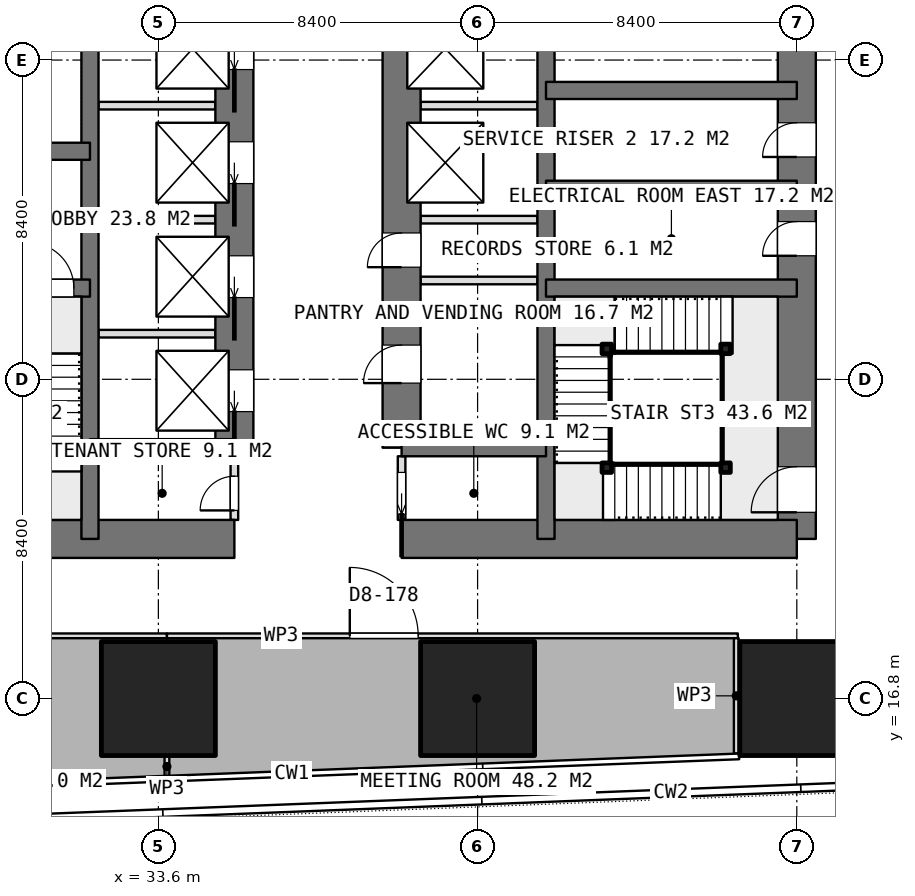
"""IFC4 building model, lengths in metres.
Left out: names, types, materials, properties, quantities, classifications, styles, units other than length and angle.
Written with IfcOpenShell. Run it as: python <this file> out.ifc"""

import sys

from ifc_helpers import new_model, si_unit, direction, frame, frame_2d, origin, origin_2d, place, context, subcontext, project, spatial, rectangle, extrude, element, fill, save


model = new_model("IFC4")
c1 = context("Model", 3, precision=1e-05, world=origin(), true_north=direction((0.0, 1.0)))
c2 = subcontext(c1, "Body", "Model", "MODEL_VIEW")
j1 = project(units=[si_unit("LENGTHUNIT", "METRE"), si_unit("PLANEANGLEUNIT", "RADIAN")], contexts=[c1])
p1 = place(None, origin())
s1 = spatial("IfcSite", under=j1, at=p1, CompositionType="ELEMENT")
p2 = place(p1, origin())
s2 = spatial("IfcBuilding", under=s1, at=p2, CompositionType="ELEMENT")
p3 = place(p2, frame((0.0, 0.0, 155.3)))
s3 = spatial("IfcBuildingStorey", under=s2, at=p3, CompositionType="ELEMENT", Elevation=155.3)
p4 = place(p3, frame((25.2, 21.0, 0.0), z_axis=(0.0, 0.0, 1.0), x_axis=(1.0, 0.0, 0.0)))
e1 = element("IfcWall", 1, at=p4, inside=s3, PredefinedType="SHEAR", context=c2, shape_type="SweptSolid", body=[
    extrude(rectangle(XDim=10.4, YDim=1.0, at=frame_2d((5.2, 0.0))), origin(), (0.0, 0.0, 1.0), 3.75),
])
p5 = place(p3, frame((40.0, 21.0, 0.0), z_axis=(0.0, 0.0, 1.0), x_axis=(1.0, 0.0, 0.0)))
e2 = element("IfcWall", 2, at=p5, inside=s3, PredefinedType="SHEAR", context=c2, shape_type="SweptSolid", body=[
    extrude(rectangle(XDim=10.4, YDim=1.0, at=frame_2d((5.2, 0.0))), origin(), (0.0, 0.0, 1.0), 3.75),
])
p6 = place(p3, frame((50.4, 21.0, 0.0), z_axis=(0.0, 0.0, 1.0), x_axis=(0.0, 1.0, 0.0)))
e3 = element("IfcWall", 3, at=p6, inside=s3, PredefinedType="SHEAR", context=c2, shape_type="SweptSolid", body=[
    extrude(rectangle(XDim=25.2, YDim=1.0, at=frame_2d((12.6, 0.0))), origin(), (0.0, 0.0, 1.0), 3.75),
])
p7 = place(p6, frame((16.2, 0.0, 0.0)))
e4 = element("IfcOpeningElement", 4, at=p7, cuts=e3, PredefinedType="OPENING", context=c2, shape_type="SweptSolid", body=[
    extrude(rectangle(XDim=1.2, YDim=2.1, at=frame_2d((0.6, 1.05))), frame((0.0, 0.51, 0.0), z_axis=(0.0, -1.0, 0.0), x_axis=(1.0, 0.0, 0.0)), (0.0, 0.0, 1.0), 1.02),
])
p8 = place(p6, frame((10.05, 0.0, 0.0)))
e5 = element("IfcOpeningElement", 5, at=p8, cuts=e3, PredefinedType="OPENING", context=c2, shape_type="SweptSolid", body=[
    extrude(rectangle(XDim=0.9, YDim=2.1, at=frame_2d((0.45, 1.05))), frame((0.0, 0.51, 0.0), z_axis=(0.0, -1.0, 0.0), x_axis=(1.0, 0.0, 0.0)), (0.0, 0.0, 1.0), 1.02),
])
p9 = place(p6, frame((7.45, 0.0, 0.0)))
e6 = element("IfcOpeningElement", 6, at=p9, cuts=e3, PredefinedType="OPENING", context=c2, shape_type="SweptSolid", body=[
    extrude(rectangle(XDim=0.9, YDim=2.1, at=frame_2d((0.45, 1.05))), frame((0.0, 0.51, 0.0), z_axis=(0.0, -1.0, 0.0), x_axis=(1.0, 0.0, 0.0)), (0.0, 0.0, 1.0), 1.02),
])
p10 = place(p6, frame((0.7, 0.0, 0.0)))
e7 = element("IfcOpeningElement", 7, at=p10, cuts=e3, PredefinedType="OPENING", context=c2, shape_type="SweptSolid", body=[
    extrude(rectangle(XDim=1.2, YDim=2.1, at=frame_2d((0.6, 1.05))), frame((0.0, 0.51, 0.0), z_axis=(0.0, -1.0, 0.0), x_axis=(1.0, 0.0, 0.0)), (0.0, 0.0, 1.0), 1.02),
])
for number, where, z_axis, x_axis in (
    (8, (31.8, 21.0, 0.0), (0.0, 0.0, 1.0), (0.0, 1.0, 0.0)),
    (9, (43.8, 21.0, 0.0), (0.0, 0.0, 1.0), (0.0, 1.0, 0.0)),
):
    element("IfcWall", number, at=place(p3, frame(where, z_axis=z_axis, x_axis=x_axis)), inside=s3, PredefinedType="SHEAR", context=c2, shape_type="SweptSolid", body=[
        extrude(rectangle(XDim=25.2, YDim=0.45, at=frame_2d((12.6, 0.0))), origin(), (0.0, 0.0, 1.0), 3.75),
    ])
p11 = place(p3, frame((35.6, 23.4, 0.0), z_axis=(0.0, 0.0, 1.0), x_axis=(0.0, 1.0, 0.0)))
e10 = element("IfcWall", 10, at=p11, inside=s3, PredefinedType="SHEAR", context=c2, shape_type="SweptSolid", body=[
    extrude(rectangle(XDim=18.0, YDim=1.0, at=frame_2d((9.0, 0.0))), origin(), (0.0, 0.0, 1.0), 3.75),
])
p12 = place(p11, frame((0.95, 0.0, 0.0)))
e11 = element("IfcOpeningElement", 11, at=p12, cuts=e10, PredefinedType="OPENING", context=c2, shape_type="SweptSolid", body=[
    extrude(rectangle(XDim=1.1, YDim=2.1, at=frame_2d((0.55, 1.05))), frame((0.0, 0.51, 0.0), z_axis=(0.0, -1.0, 0.0), x_axis=(1.0, 0.0, 0.0)), (0.0, 0.0, 1.0), 1.02),
])
p13 = place(p11, frame((3.95, 0.0, 0.0)))
e12 = element("IfcOpeningElement", 12, at=p13, cuts=e10, PredefinedType="OPENING", context=c2, shape_type="SweptSolid", body=[
    extrude(rectangle(XDim=1.1, YDim=2.1, at=frame_2d((0.55, 1.05))), frame((0.0, 0.51, 0.0), z_axis=(0.0, -1.0, 0.0), x_axis=(1.0, 0.0, 0.0)), (0.0, 0.0, 1.0), 1.02),
])
p14 = place(p11, frame((6.95, 0.0, 0.0)))
e13 = element("IfcOpeningElement", 13, at=p14, cuts=e10, PredefinedType="OPENING", context=c2, shape_type="SweptSolid", body=[
    extrude(rectangle(XDim=1.1, YDim=2.1, at=frame_2d((0.55, 1.05))), frame((0.0, 0.51, 0.0), z_axis=(0.0, -1.0, 0.0), x_axis=(1.0, 0.0, 0.0)), (0.0, 0.0, 1.0), 1.02),
])
p15 = place(p11, frame((9.95, 0.0, 0.0)))
e14 = element("IfcOpeningElement", 14, at=p15, cuts=e10, PredefinedType="OPENING", context=c2, shape_type="SweptSolid", body=[
    extrude(rectangle(XDim=1.1, YDim=2.1, at=frame_2d((0.55, 1.05))), frame((0.0, 0.51, 0.0), z_axis=(0.0, -1.0, 0.0), x_axis=(1.0, 0.0, 0.0)), (0.0, 0.0, 1.0), 1.02),
])
p16 = place(p11, frame((12.95, 0.0, 0.0)))
e15 = element("IfcOpeningElement", 15, at=p16, cuts=e10, PredefinedType="OPENING", context=c2, shape_type="SweptSolid", body=[
    extrude(rectangle(XDim=1.1, YDim=2.1, at=frame_2d((0.55, 1.05))), frame((0.0, 0.51, 0.0), z_axis=(0.0, -1.0, 0.0), x_axis=(1.0, 0.0, 0.0)), (0.0, 0.0, 1.0), 1.02),
])
p17 = place(p11, frame((15.95, 0.0, 0.0)))
e16 = element("IfcOpeningElement", 16, at=p17, cuts=e10, PredefinedType="OPENING", context=c2, shape_type="SweptSolid", body=[
    extrude(rectangle(XDim=1.1, YDim=2.1, at=frame_2d((0.55, 1.05))), frame((0.0, 0.51, 0.0), z_axis=(0.0, -1.0, 0.0), x_axis=(1.0, 0.0, 0.0)), (0.0, 0.0, 1.0), 1.02),
])
p18 = place(p3, frame((40.0, 23.4, 0.0), z_axis=(0.0, 0.0, 1.0), x_axis=(0.0, 1.0, 0.0)))
e17 = element("IfcWall", 17, at=p18, inside=s3, PredefinedType="SHEAR", context=c2, shape_type="SweptSolid", body=[
    extrude(rectangle(XDim=18.0, YDim=1.0, at=frame_2d((9.0, 0.0))), origin(), (0.0, 0.0, 1.0), 3.75),
])
p19 = place(p18, frame((1.7, 0.0, 0.0)))
e18 = element("IfcOpeningElement", 18, at=p19, cuts=e17, PredefinedType="OPENING", context=c2, shape_type="SweptSolid", body=[
    extrude(rectangle(XDim=1.0, YDim=2.1, at=frame_2d((0.5, 1.05))), frame((0.0, 0.51, 0.0), z_axis=(0.0, -1.0, 0.0), x_axis=(1.0, 0.0, 0.0)), (0.0, 0.0, 1.0), 1.02),
])
p20 = place(p18, frame((4.75, 0.0, 0.0)))
e19 = element("IfcOpeningElement", 19, at=p20, cuts=e17, PredefinedType="OPENING", context=c2, shape_type="SweptSolid", body=[
    extrude(rectangle(XDim=0.9, YDim=2.1, at=frame_2d((0.45, 1.05))), frame((0.0, 0.51, 0.0), z_axis=(0.0, -1.0, 0.0), x_axis=(1.0, 0.0, 0.0)), (0.0, 0.0, 1.0), 1.02),
])
for number, where, z_axis, x_axis in (
    (20, (31.8, 23.4, 0.0), (0.0, 0.0, 1.0), (1.0, 0.0, 0.0)),
    (21, (40.0, 23.4, 0.0), (0.0, 0.0, 1.0), (1.0, 0.0, 0.0)),
):
    element("IfcWall", number, at=place(p3, frame(where, z_axis=z_axis, x_axis=x_axis)), inside=s3, PredefinedType="SHEAR", context=c2, shape_type="SweptSolid", body=[
        extrude(rectangle(XDim=3.8, YDim=0.45, at=frame_2d((1.9, 0.0))), origin(), (0.0, 0.0, 1.0), 3.75),
    ])
p21 = place(p3, frame((25.2, 27.6, 0.0), z_axis=(0.0, 0.0, 1.0), x_axis=(1.0, 0.0, 0.0)))
e22 = element("IfcWall", 22, at=p21, inside=s3, PredefinedType="SHEAR", context=c2, shape_type="SweptSolid", body=[
    extrude(rectangle(XDim=6.6, YDim=0.45, at=frame_2d((3.3, 0.0))), origin(), (0.0, 0.0, 1.0), 3.75),
])
p22 = place(p21, frame((4.975, 0.0, 0.0)))
e23 = element("IfcOpeningElement", 23, at=p22, cuts=e22, PredefinedType="OPENING", context=c2, shape_type="SweptSolid", body=[
    extrude(rectangle(XDim=1.2, YDim=2.1, at=frame_2d((0.6, 1.05))), frame((0.0, 0.235, 0.0), z_axis=(0.0, -1.0, 0.0), x_axis=(1.0, 0.0, 0.0)), (0.0, 0.0, 1.0), 0.47),
])
p23 = place(p3, frame((25.2, 31.2, 0.0), z_axis=(0.0, 0.0, 1.0), x_axis=(1.0, 0.0, 0.0)))
e24 = element("IfcWall", 24, at=p23, inside=s3, PredefinedType="SHEAR", context=c2, shape_type="SweptSolid", body=[
    extrude(rectangle(XDim=6.6, YDim=0.45, at=frame_2d((3.3, 0.0))), origin(), (0.0, 0.0, 1.0), 3.75),
])
p24 = place(p23, frame((2.65, 0.0, 0.0)))
e25 = element("IfcOpeningElement", 25, at=p24, cuts=e24, PredefinedType="OPENING", context=c2, shape_type="SweptSolid", body=[
    extrude(rectangle(XDim=1.3, YDim=2.1, at=frame_2d((0.65, 1.05))), frame((0.0, 0.235, 0.0), z_axis=(0.0, -1.0, 0.0), x_axis=(1.0, 0.0, 0.0)), (0.0, 0.0, 1.0), 0.47),
])
for number, where, z_axis, x_axis in (
    (26, (43.8, 27.6, 0.0), (0.0, 0.0, 1.0), (1.0, 0.0, 0.0)),
    (27, (43.8, 30.2, 0.0), (0.0, 0.0, 1.0), (1.0, 0.0, 0.0)),
    (28, (43.8, 32.8, 0.0), (0.0, 0.0, 1.0), (1.0, 0.0, 0.0)),
):
    element("IfcWall", number, at=place(p3, frame(where, z_axis=z_axis, x_axis=x_axis)), inside=s3, PredefinedType="SHEAR", context=c2, shape_type="SweptSolid", body=[
        extrude(rectangle(XDim=6.6, YDim=0.45, at=frame_2d((3.3, 0.0))), origin(), (0.0, 0.0, 1.0), 3.75),
    ])
for number, where, z_axis, x_axis in (
    (29, (33.6, 16.8, 0.0), (0.0, 0.0, 1.0), (1.0, 0.0, 0.0)),
    (30, (42.0, 16.8, 0.0), (0.0, 0.0, 1.0), (1.0, 0.0, 0.0)),
    (31, (50.4, 16.8, 0.0), (0.0, 0.0, 1.0), (1.0, 0.0, 0.0)),
):
    element("IfcColumn", number, at=place(p3, frame(where, z_axis=z_axis, x_axis=x_axis)), inside=s3, PredefinedType="COLUMN", context=c2, shape_type="SweptSolid", body=[
        extrude(rectangle(XDim=3.0, YDim=3.0, at=origin_2d()), origin(), (0.0, 0.0, 1.0), 3.75),
    ])
for number, where, z_axis, x_axis in (
    (32, (32.025, 26.4, 0.0), (0.0, 0.0, 1.0), (1.0, 0.0, 0.0)),
    (33, (32.025, 29.4, 0.0), (0.0, 0.0, 1.0), (1.0, 0.0, 0.0)),
    (34, (32.025, 32.4, 0.0), (0.0, 0.0, 1.0), (1.0, 0.0, 0.0)),
):
    element("IfcWall", number, at=place(p3, frame(where, z_axis=z_axis, x_axis=x_axis)), inside=s3, PredefinedType="PARTITIONING", context=c2, shape_type="SweptSolid", body=[
        extrude(rectangle(XDim=3.075, YDim=0.2, at=frame_2d((1.538, 0.0))), origin(), (0.0, 0.0, 1.0), 3.5),
    ])
for number, where, z_axis, x_axis in (
    (35, (40.5, 29.4, 0.0), (0.0, 0.0, 1.0), (1.0, 0.0, 0.0)),
    (36, (40.5, 32.4, 0.0), (0.0, 0.0, 1.0), (1.0, 0.0, 0.0)),
):
    element("IfcWall", number, at=place(p3, frame(where, z_axis=z_axis, x_axis=x_axis)), inside=s3, PredefinedType="PARTITIONING", context=c2, shape_type="SweptSolid", body=[
        extrude(rectangle(XDim=3.075, YDim=0.2, at=frame_2d((1.538, 0.0))), origin(), (0.0, 0.0, 1.0), 3.5),
    ])
p25 = place(p3, frame((40.0, 21.5, 0.0), z_axis=(0.0, 0.0, 1.0), x_axis=(0.0, 1.0, 0.0)))
e37 = element("IfcWall", 37, at=p25, inside=s3, PredefinedType="PARTITIONING", context=c2, shape_type="SweptSolid", body=[
    extrude(rectangle(XDim=1.675, YDim=0.2, at=frame_2d((0.837, 0.0))), origin(), (0.0, 0.0, 1.0), 3.5),
])
p26 = place(p25, frame((0.15, 0.0, 0.0)))
e38 = element("IfcOpeningElement", 38, at=p26, cuts=e37, PredefinedType="OPENING", context=c2, shape_type="SweptSolid", body=[
    extrude(rectangle(XDim=1.1, YDim=2.1, at=frame_2d((0.55, 1.05))), frame((0.0, 0.11, 0.0), z_axis=(0.0, -1.0, 0.0), x_axis=(1.0, 0.0, 0.0)), (0.0, 0.0, 1.0), 0.22),
])
p27 = place(p3, frame((35.6, 21.5, 0.0), z_axis=(0.0, 0.0, 1.0), x_axis=(0.0, 1.0, 0.0)))
e39 = element("IfcWall", 39, at=p27, inside=s3, PredefinedType="PARTITIONING", context=c2, shape_type="SweptSolid", body=[
    extrude(rectangle(XDim=1.675, YDim=0.2, at=frame_2d((0.837, 0.0))), origin(), (0.0, 0.0, 1.0), 3.5),
])
p28 = place(p27, frame((0.25, 0.0, 0.0)))
e40 = element("IfcOpeningElement", 40, at=p28, cuts=e39, PredefinedType="OPENING", context=c2, shape_type="SweptSolid", body=[
    extrude(rectangle(XDim=0.9, YDim=2.1, at=frame_2d((0.45, 1.05))), frame((0.0, 0.11, 0.0), z_axis=(0.0, -1.0, 0.0), x_axis=(1.0, 0.0, 0.0)), (0.0, 0.0, 1.0), 0.22),
])
p29 = place(p3, frame((40.5, 27.8, 0.0), z_axis=(0.0, 0.0, 1.0), x_axis=(1.0, 0.0, 0.0)))
e41 = element("IfcWall", 41, at=p29, inside=s3, PredefinedType="PARTITIONING", context=c2, shape_type="SweptSolid", body=[
    extrude(rectangle(XDim=3.075, YDim=0.2, at=frame_2d((1.538, 0.0))), origin(), (0.0, 0.0, 1.0), 3.5),
])
p30 = place(p3, frame((25.38, 18.45, 0.0), z_axis=(0.0, 0.0, 1.0), x_axis=(1.0, 0.0, 0.0)))
e42 = element("IfcWall", 42, at=p30, inside=s3, PredefinedType="PARTITIONING", context=c2, shape_type="SweptSolid", body=[
    extrude(rectangle(XDim=8.445, YDim=0.125, at=frame_2d((4.223, 0.0))), origin(), (0.0, 0.0, 1.0), 3.5),
])
p31 = place(p30, frame((3.723, 0.0, 0.0)))
e43 = element("IfcOpeningElement", 43, at=p31, cuts=e42, PredefinedType="OPENING", context=c2, shape_type="SweptSolid", body=[
    extrude(rectangle(XDim=1.0, YDim=2.1, at=frame_2d((0.5, 1.05))), frame((0.0, 0.073, 0.0), z_axis=(0.0, -1.0, 0.0), x_axis=(1.0, 0.0, 0.0)), (0.0, 0.0, 1.0), 0.145),
])
p32 = place(p3, frame((33.825, 15.28, 0.0), z_axis=(0.0, 0.0, 1.0), x_axis=(0.0, -1.0, 0.0)))
e44 = element("IfcWall", 44, at=p32, inside=s3, PredefinedType="PARTITIONING", context=c2, shape_type="SweptSolid", body=[
    extrude(rectangle(XDim=0.538, YDim=0.125, at=frame_2d((0.269, 0.0))), origin(), (0.0, 0.0, 1.0), 3.5),
])
p33 = place(p3, frame((33.826, 18.45, 0.0), z_axis=(0.0, 0.0, 1.0), x_axis=(1.0, 0.0, 0.0)))
e45 = element("IfcWall", 45, at=p33, inside=s3, PredefinedType="PARTITIONING", context=c2, shape_type="SweptSolid", body=[
    extrude(rectangle(XDim=15.022, YDim=0.125, at=frame_2d((7.511, 0.0))), origin(), (0.0, 0.0, 1.0), 3.5),
])
p34 = place(p33, frame((4.811, 0.0, 0.0)))
e46 = element("IfcOpeningElement", 46, at=p34, cuts=e45, PredefinedType="OPENING", context=c2, shape_type="SweptSolid", body=[
    extrude(rectangle(XDim=1.8, YDim=2.1, at=frame_2d((0.9, 1.05))), frame((0.0, 0.073, 0.0), z_axis=(0.0, -1.0, 0.0), x_axis=(1.0, 0.0, 0.0)), (0.0, 0.0, 1.0), 0.145),
])
p35 = place(p3, frame((48.807, 18.387, 0.0), z_axis=(0.0, 0.0, 1.0), x_axis=(0.0, -1.0, 0.0)))
e47 = element("IfcWall", 47, at=p35, inside=s3, PredefinedType="PARTITIONING", context=c2, shape_type="SweptSolid", body=[
    extrude(rectangle(XDim=3.032, YDim=0.125, at=frame_2d((1.516, 0.0))), origin(), (0.0, 0.0, 1.0), 3.5),
])
for number, where, z_axis, x_axis in (
    (48, (48.525, 22.875, 0.0), (0.0, 0.0, 1.0), (1.0, 0.0, 0.0)),
    (49, (45.4, 22.875, 0.0), (0.0, 0.0, 1.0), (1.0, 0.0, 0.0)),
    (50, (45.4, 26.0, 0.0), (0.0, 0.0, 1.0), (1.0, 0.0, 0.0)),
    (51, (48.525, 26.0, 0.0), (0.0, 0.0, 1.0), (1.0, 0.0, 0.0)),
):
    element("IfcColumn", number, at=place(p3, frame(where, z_axis=z_axis, x_axis=x_axis)), inside=s3, PredefinedType="COLUMN", context=c2, shape_type="SweptSolid", body=[
        extrude(rectangle(XDim=0.25, YDim=0.25, at=origin_2d()), origin(), (0.0, 0.0, 1.0), 3.75),
    ])
p36 = place(p8, origin())
e52 = element("IfcDoor", 52, at=p36, inside=s3, OperationType="SINGLE_SWING_LEFT", PredefinedType="DOOR", context=c2, shape_type="SweptSolid", body=[
    extrude(rectangle(XDim=0.9, YDim=2.1, at=frame_2d((0.45, 1.05))), frame((0.0, 0.025, 0.0), z_axis=(0.0, -1.0, 0.0), x_axis=(1.0, 0.0, 0.0)), (0.0, 0.0, 1.0), 0.05),
])
fill(e5, e52)
p37 = place(p9, origin())
e53 = element("IfcDoor", 53, at=p37, inside=s3, OperationType="SINGLE_SWING_LEFT", PredefinedType="DOOR", context=c2, shape_type="SweptSolid", body=[
    extrude(rectangle(XDim=0.9, YDim=2.1, at=frame_2d((0.45, 1.05))), frame((0.0, 0.025, 0.0), z_axis=(0.0, -1.0, 0.0), x_axis=(1.0, 0.0, 0.0)), (0.0, 0.0, 1.0), 0.05),
])
fill(e6, e53)
p38 = place(p26, origin())
e54 = element("IfcDoor", 54, at=p38, inside=s3, OperationType="SLIDING_TO_LEFT", PredefinedType="DOOR", context=c2, shape_type="SweptSolid", body=[
    extrude(rectangle(XDim=1.1, YDim=2.1, at=frame_2d((0.55, 1.05))), frame((0.0, 0.025, 0.0), z_axis=(0.0, -1.0, 0.0), x_axis=(1.0, 0.0, 0.0)), (0.0, 0.0, 1.0), 0.05),
])
fill(e38, e54)
p39 = place(p28, origin())
e55 = element("IfcDoor", 55, at=p39, inside=s3, OperationType="SINGLE_SWING_LEFT", PredefinedType="DOOR", context=c2, shape_type="SweptSolid", body=[
    extrude(rectangle(XDim=0.9, YDim=2.1, at=frame_2d((0.45, 1.05))), frame((0.0, 0.025, 0.0), z_axis=(0.0, -1.0, 0.0), x_axis=(1.0, 0.0, 0.0)), (0.0, 0.0, 1.0), 0.05),
])
fill(e40, e55)
p40 = place(p19, origin())
e56 = element("IfcDoor", 56, at=p40, inside=s3, OperationType="SINGLE_SWING_LEFT", PredefinedType="DOOR", context=c2, shape_type="SweptSolid", body=[
    extrude(rectangle(XDim=1.0, YDim=2.1, at=frame_2d((0.5, 1.05))), frame((0.0, 0.025, 0.0), z_axis=(0.0, -1.0, 0.0), x_axis=(1.0, 0.0, 0.0)), (0.0, 0.0, 1.0), 0.05),
])
fill(e18, e56)
p41 = place(p20, origin())
e57 = element("IfcDoor", 57, at=p41, inside=s3, OperationType="SINGLE_SWING_LEFT", PredefinedType="DOOR", context=c2, shape_type="SweptSolid", body=[
    extrude(rectangle(XDim=0.9, YDim=2.1, at=frame_2d((0.45, 1.05))), frame((0.0, 0.025, 0.0), z_axis=(0.0, -1.0, 0.0), x_axis=(1.0, 0.0, 0.0)), (0.0, 0.0, 1.0), 0.05),
])
fill(e19, e57)
p42 = place(p12, origin())
e58 = element("IfcDoor", 58, at=p42, inside=s3, OperationType="SLIDING_TO_LEFT", PredefinedType="USERDEFINED", context=c2, shape_type="SweptSolid", body=[
    extrude(rectangle(XDim=1.1, YDim=2.1, at=frame_2d((0.55, 1.05))), frame((0.0, 0.025, 0.0), z_axis=(0.0, -1.0, 0.0), x_axis=(1.0, 0.0, 0.0)), (0.0, 0.0, 1.0), 0.05),
])
fill(e11, e58)
p43 = place(p13, origin())
e59 = element("IfcDoor", 59, at=p43, inside=s3, OperationType="SLIDING_TO_LEFT", PredefinedType="USERDEFINED", context=c2, shape_type="SweptSolid", body=[
    extrude(rectangle(XDim=1.1, YDim=2.1, at=frame_2d((0.55, 1.05))), frame((0.0, 0.025, 0.0), z_axis=(0.0, -1.0, 0.0), x_axis=(1.0, 0.0, 0.0)), (0.0, 0.0, 1.0), 0.05),
])
fill(e12, e59)
p44 = place(p14, origin())
e60 = element("IfcDoor", 60, at=p44, inside=s3, OperationType="SLIDING_TO_LEFT", PredefinedType="USERDEFINED", context=c2, shape_type="SweptSolid", body=[
    extrude(rectangle(XDim=1.1, YDim=2.1, at=frame_2d((0.55, 1.05))), frame((0.0, 0.025, 0.0), z_axis=(0.0, -1.0, 0.0), x_axis=(1.0, 0.0, 0.0)), (0.0, 0.0, 1.0), 0.05),
])
fill(e13, e60)
p45 = place(p15, origin())
e61 = element("IfcDoor", 61, at=p45, inside=s3, OperationType="SLIDING_TO_LEFT", PredefinedType="USERDEFINED", context=c2, shape_type="SweptSolid", body=[
    extrude(rectangle(XDim=1.1, YDim=2.1, at=frame_2d((0.55, 1.05))), frame((0.0, 0.025, 0.0), z_axis=(0.0, -1.0, 0.0), x_axis=(1.0, 0.0, 0.0)), (0.0, 0.0, 1.0), 0.05),
])
fill(e14, e61)
p46 = place(p34, origin())
e62 = element("IfcDoor", 62, at=p46, inside=s3, OperationType="DOUBLE_DOOR_SINGLE_SWING", PredefinedType="DOOR", context=c2, shape_type="SweptSolid", body=[
    extrude(rectangle(XDim=1.8, YDim=2.1, at=frame_2d((0.9, 1.05))), frame((0.0, 0.025, 0.0), z_axis=(0.0, -1.0, 0.0), x_axis=(1.0, 0.0, 0.0)), (0.0, 0.0, 1.0), 0.05),
])
fill(e46, e62)
p47 = place(p22, origin())
e63 = element("IfcDoor", 63, at=p47, inside=s3, OperationType="SINGLE_SWING_RIGHT", PredefinedType="DOOR", context=c2, shape_type="SweptSolid", body=[
    extrude(rectangle(XDim=1.2, YDim=2.1, at=frame_2d((0.6, 1.05))), frame((0.0, 0.025, 0.0), z_axis=(0.0, -1.0, 0.0), x_axis=(1.0, 0.0, 0.0)), (0.0, 0.0, 1.0), 0.05),
])
fill(e23, e63)
p48 = place(p10, origin())
e64 = element("IfcDoor", 64, at=p48, inside=s3, OperationType="SINGLE_SWING_RIGHT", PredefinedType="DOOR", context=c2, shape_type="SweptSolid", body=[
    extrude(rectangle(XDim=1.2, YDim=2.1, at=frame_2d((0.6, 1.05))), frame((0.0, 0.025, 0.0), z_axis=(0.0, -1.0, 0.0), x_axis=(1.0, 0.0, 0.0)), (0.0, 0.0, 1.0), 0.05),
])
fill(e7, e64)
save(model, sys.argv[1])
